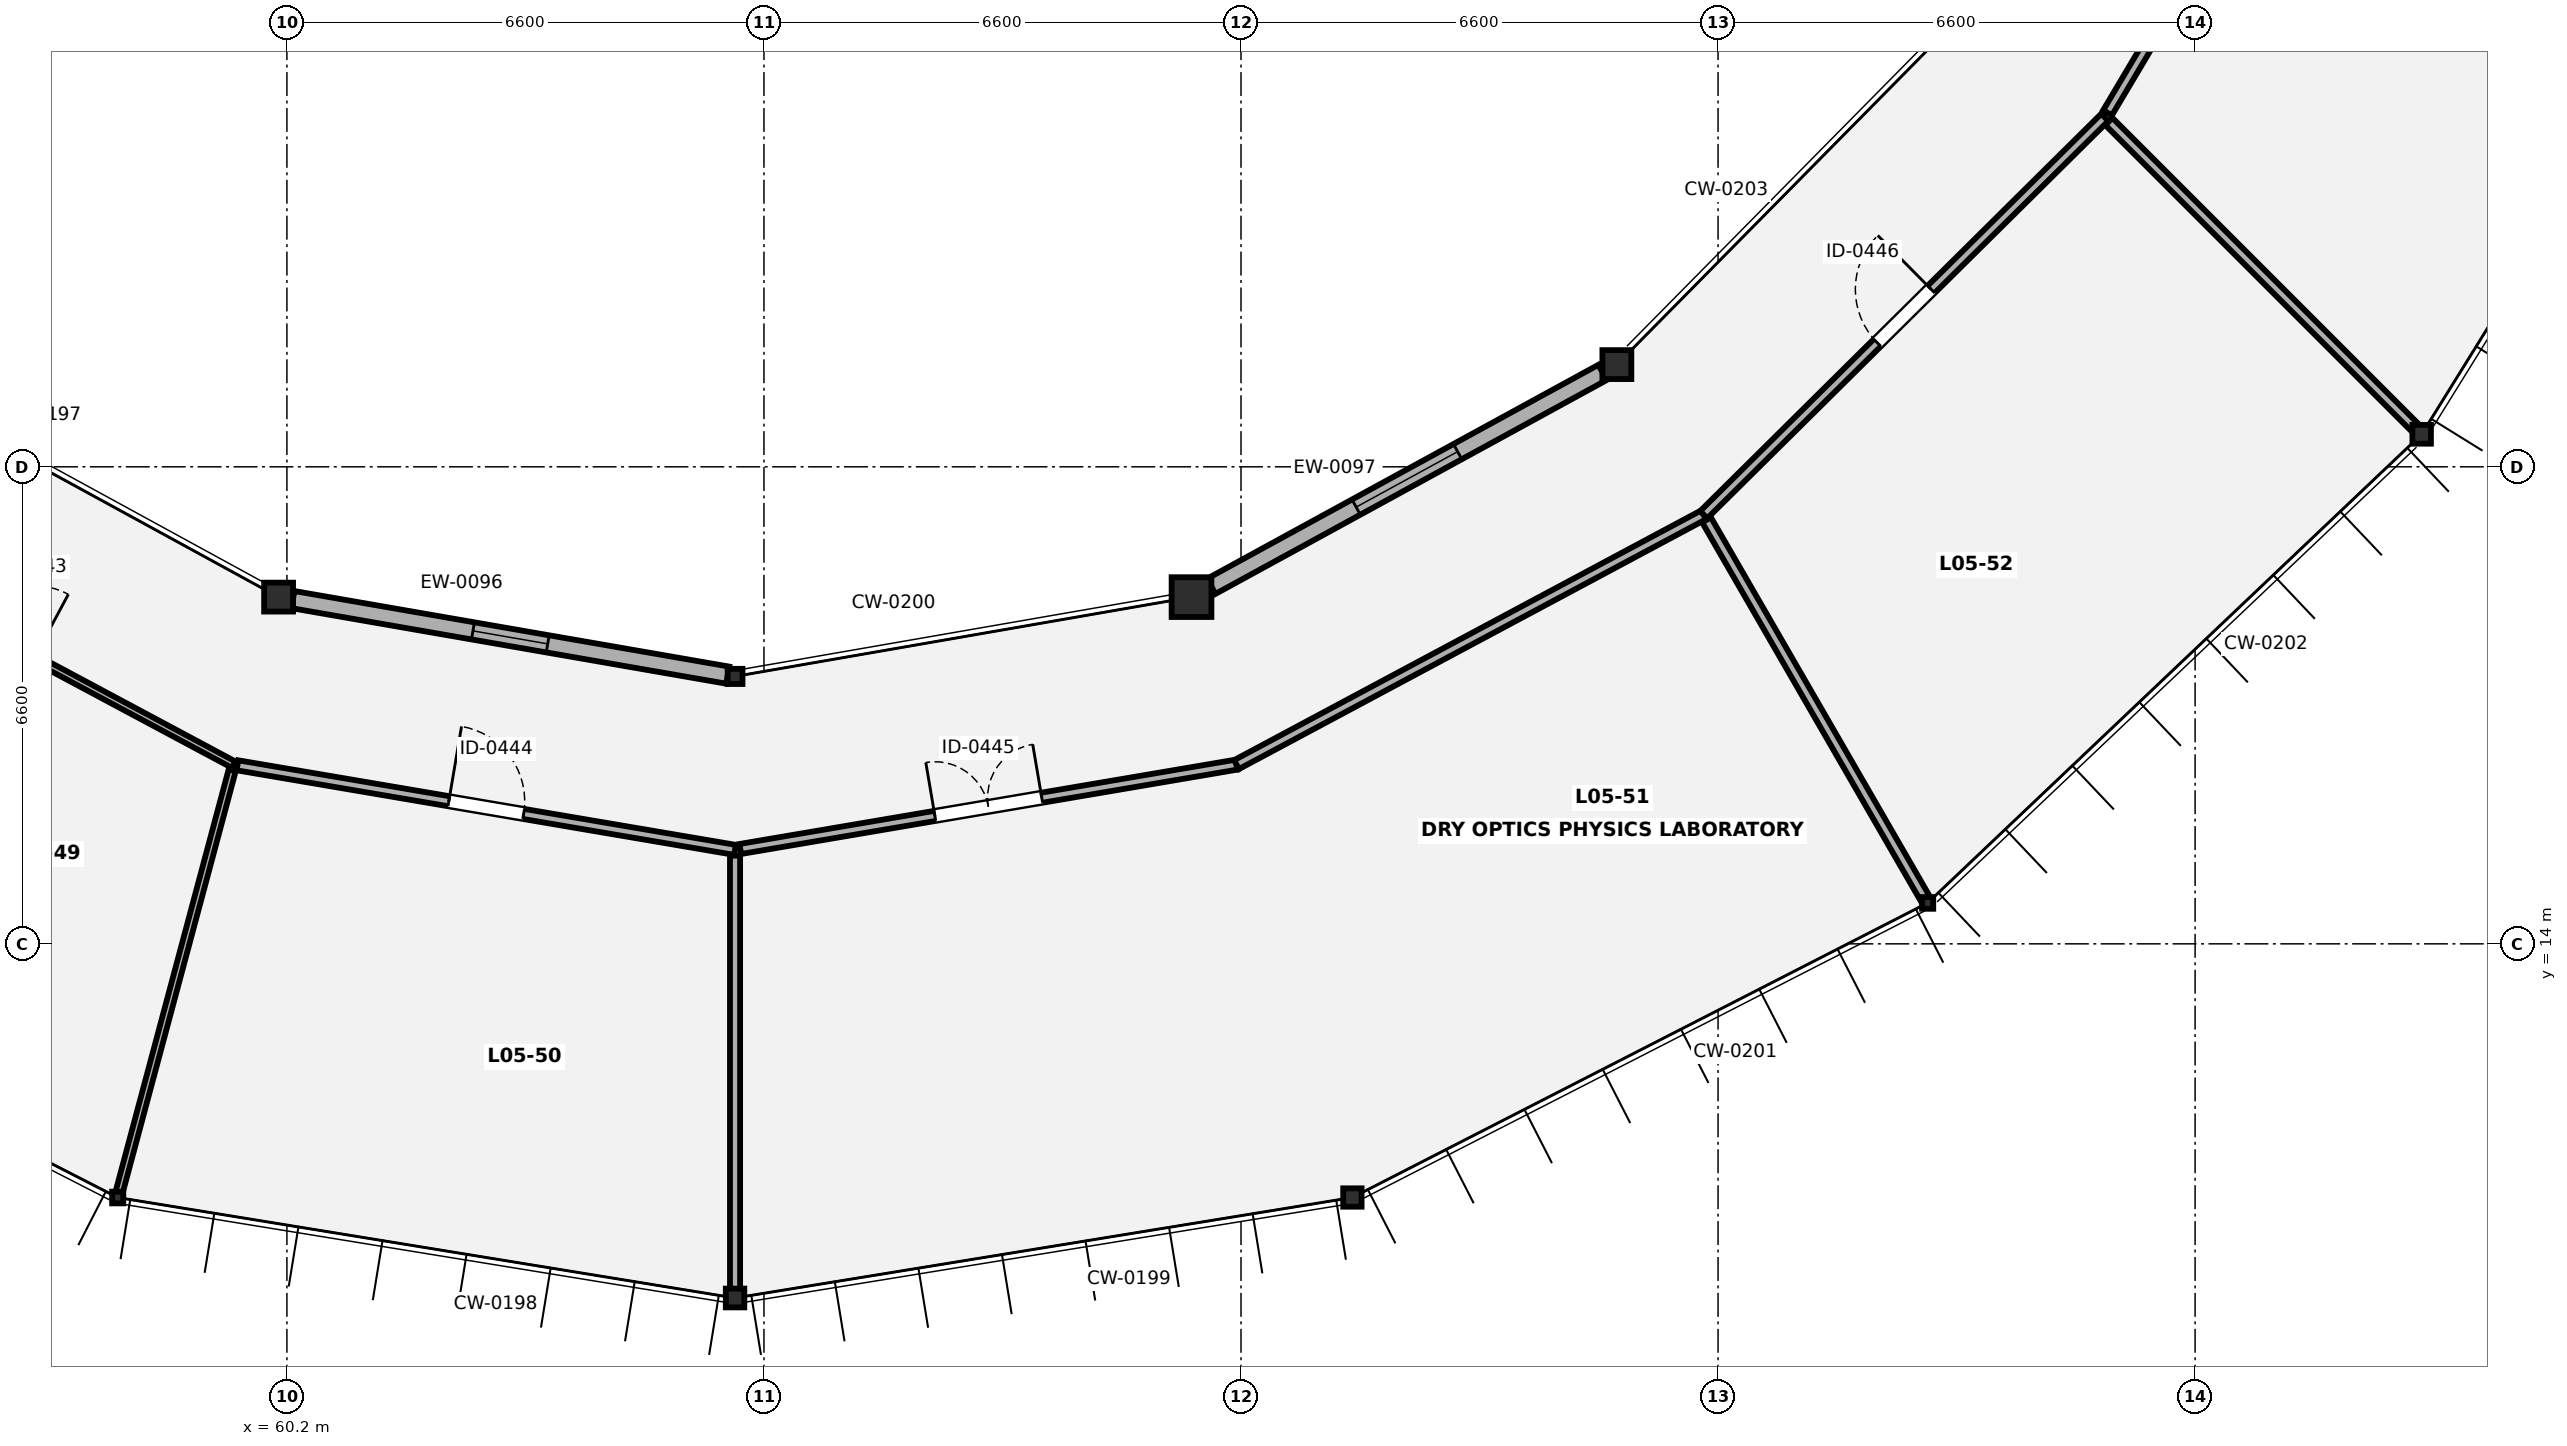
"""IFC4 building model, lengths in metres.
Left out: names, types, materials, properties, quantities, classifications, styles, units other than length and angle.
Written with IfcOpenShell. Run it as: python <this file> out.ifc"""

import sys

from ifc_helpers import new_model, si_unit, direction, frame, frame_2d, origin, origin_2d, place, context, subcontext, project, spatial, rectangle, i_section, extrude, element, fill, save


model = new_model("IFC4")
c1 = context("Model", 3, precision=1e-05, world=origin(), true_north=direction((0.0, 1.0)))
c2 = subcontext(c1, "Body", "Model", "MODEL_VIEW")
j1 = project(units=[si_unit("LENGTHUNIT", "METRE"), si_unit("PLANEANGLEUNIT", "RADIAN")], contexts=[c1])
p1 = place(None, origin())
s1 = spatial("IfcSite", under=j1, at=p1, CompositionType="ELEMENT")
p2 = place(p1, origin())
s2 = spatial("IfcBuilding", under=s1, at=p2, CompositionType="ELEMENT")
p3 = place(p2, frame((0.0, 0.0, 21.7)))
s3 = spatial("IfcBuildingStorey", under=s2, at=p3, CompositionType="ELEMENT", Elevation=21.7)
p4 = place(p3, frame((57.859, 10.49, 0.0), z_axis=(0.0, 0.0, 1.0), x_axis=(1.0, 0.0, 0.0)))
e1 = element("IfcColumn", 1, at=p4, inside=s3, PredefinedType="COLUMN", context=c2, shape_type="SweptSolid", body=[
    extrude(i_section(OverallWidth=0.154, OverallDepth=0.162, WebThickness=0.008, FlangeThickness=0.011, FilletRadius=0.009, at=origin_2d()), origin(), (0.0, 0.0, 1.0), 4.2),
])
p5 = place(p3, frame((60.085, 18.797, 0.0), z_axis=(0.0, 0.0, 1.0), x_axis=(1.0, 0.0, 0.0)))
e2 = element("IfcColumn", 2, at=p5, inside=s3, PredefinedType="PILASTER", context=c2, shape_type="SweptSolid", body=[
    extrude(rectangle(XDim=0.4, YDim=0.4, at=origin_2d()), origin(), (0.0, 0.0, 1.0), 4.2),
])
p6 = place(p3, frame((66.4, 9.1, 0.0), z_axis=(0.0, 0.0, 1.0), x_axis=(1.0, 0.0, 0.0)))
e3 = element("IfcColumn", 3, at=p6, inside=s3, PredefinedType="COLUMN", context=c2, shape_type="SweptSolid", body=[
    extrude(i_section(OverallWidth=0.256, OverallDepth=0.26, WebThickness=0.01, FlangeThickness=0.017, FilletRadius=0.014, at=origin_2d()), origin(), (0.0, 0.0, 1.0), 4.2),
])
p7 = place(p3, frame((66.4, 17.7, 0.0), z_axis=(0.0, 0.0, 1.0), x_axis=(1.0, 0.0, 0.0)))
e4 = element("IfcColumn", 4, at=p7, inside=s3, PredefinedType="COLUMN", context=c2, shape_type="SweptSolid", body=[
    extrude(i_section(OverallWidth=0.205, OverallDepth=0.21, WebThickness=0.009, FlangeThickness=0.014, FilletRadius=0.011, at=origin_2d()), origin(), (0.0, 0.0, 1.0), 4.2),
])
p8 = place(p3, frame((74.941, 10.49, 0.0), z_axis=(0.0, 0.0, 1.0), x_axis=(1.0, 0.0, 0.0)))
e5 = element("IfcColumn", 5, at=p8, inside=s3, PredefinedType="COLUMN", context=c2, shape_type="SweptSolid", body=[
    extrude(i_section(OverallWidth=0.254, OverallDepth=0.254, WebThickness=0.009, FlangeThickness=0.014, FilletRadius=0.014, at=origin_2d()), origin(), (0.0, 0.0, 1.0), 4.2),
])
p9 = place(p3, frame((72.715, 18.797, 0.0), z_axis=(0.0, 0.0, 1.0), x_axis=(1.0, 0.0, 0.0)))
e6 = element("IfcColumn", 6, at=p9, inside=s3, PredefinedType="COLUMN", context=c2, shape_type="SweptSolid", body=[
    extrude(rectangle(XDim=0.55, YDim=0.55, at=origin_2d()), origin(), (0.0, 0.0, 1.0), 4.2),
])
p10 = place(p3, frame((82.9, 14.566, 0.0), z_axis=(0.0, 0.0, 1.0), x_axis=(1.0, 0.0, 0.0)))
e7 = element("IfcColumn", 7, at=p10, inside=s3, PredefinedType="COLUMN", context=c2, shape_type="SweptSolid", body=[
    extrude(i_section(OverallWidth=0.154, OverallDepth=0.162, WebThickness=0.008, FlangeThickness=0.011, FilletRadius=0.009, at=origin_2d()), origin(), (0.0, 0.0, 1.0), 4.2),
])
p11 = place(p3, frame((78.6, 22.014, 0.0), z_axis=(0.0, 0.0, 1.0), x_axis=(1.0, 0.0, 0.0)))
e8 = element("IfcColumn", 8, at=p11, inside=s3, PredefinedType="PILASTER", context=c2, shape_type="SweptSolid", body=[
    extrude(rectangle(XDim=0.4, YDim=0.4, at=origin_2d()), origin(), (0.0, 0.0, 1.0), 4.2),
])
p12 = place(p3, frame((89.735, 21.05, 0.0), z_axis=(0.0, 0.0, 1.0), x_axis=(1.0, 0.0, 0.0)))
e9 = element("IfcColumn", 9, at=p12, inside=s3, PredefinedType="COLUMN", context=c2, shape_type="SweptSolid", body=[
    extrude(i_section(OverallWidth=0.256, OverallDepth=0.26, WebThickness=0.01, FlangeThickness=0.017, FilletRadius=0.014, at=origin_2d()), origin(), (0.0, 0.0, 1.0), 4.2),
])
p13 = place(p3, frame((60.283, 18.763, 0.0), z_axis=(0.0, 0.0, 1.0), x_axis=(0.985246064368, -0.171143777706, 0.0)))
e10 = element("IfcWall", 10, at=p13, inside=s3, PredefinedType="SOLIDWALL", context=c2, shape_type="SweptSolid", body=[
    extrude(rectangle(XDim=6.107, YDim=0.24, at=frame_2d((3.053, 0.0))), origin(), (0.0, 0.0, 1.0), 3.65),
])
p14 = place(p13, frame((2.528, 0.0, 0.85)))
e11 = element("IfcOpeningElement", 11, at=p14, cuts=e10, PredefinedType="OPENING", context=c2, shape_type="SweptSolid", body=[
    extrude(rectangle(XDim=1.05, YDim=1.35, at=frame_2d((0.525, 0.675))), frame((0.0, 0.13, 0.0), z_axis=(0.0, -1.0, 0.0), x_axis=(1.0, 0.0, 0.0)), (0.0, 0.0, 1.0), 0.26),
])
p15 = place(p3, frame((72.988, 18.947, 0.0), z_axis=(0.0, 0.0, 1.0), x_axis=(0.877477839064, 0.479617182712, 0.0)))
e12 = element("IfcWall", 12, at=p15, inside=s3, PredefinedType="SOLIDWALL", context=c2, shape_type="SweptSolid", body=[
    extrude(rectangle(XDim=6.169, YDim=0.24, at=frame_2d((3.085, 0.0))), origin(), (0.0, 0.0, 1.0), 3.65),
])
p16 = place(p15, frame((2.285, 0.0, 0.85)))
e13 = element("IfcOpeningElement", 13, at=p16, cuts=e12, PredefinedType="OPENING", context=c2, shape_type="SweptSolid", body=[
    extrude(rectangle(XDim=1.6, YDim=1.5, at=frame_2d((0.8, 0.75))), frame((0.0, 0.13, 0.0), z_axis=(0.0, -1.0, 0.0), x_axis=(1.0, 0.0, 0.0)), (0.0, 0.0, 1.0), 0.26),
])
p17 = place(p3, frame((53.063, 19.902, 0.0), z_axis=(0.0, 0.0, 1.0), x_axis=(0.881826283139, -0.471574391125, 0.0)))
e14 = element("IfcWall", 14, at=p17, inside=s3, PredefinedType="PARTITIONING", context=c2, shape_type="SweptSolid", body=[
    extrude(rectangle(XDim=7.258, YDim=0.1, at=frame_2d((3.629, 0.0))), origin(), (0.0, 0.0, 1.0), 3.98),
])
p18 = place(p17, frame((3.129, 0.0, 0.0)))
e15 = element("IfcOpeningElement", 15, at=p18, cuts=e14, PredefinedType="OPENING", context=c2, shape_type="SweptSolid", body=[
    extrude(rectangle(XDim=1.0, YDim=2.1, at=frame_2d((0.5, 1.05))), frame((0.0, 0.06, 0.0), z_axis=(0.0, -1.0, 0.0), x_axis=(1.0, 0.0, 0.0)), (0.0, 0.0, 1.0), 0.12),
])
p19 = place(p3, frame((59.443, 16.402, 0.0), z_axis=(0.0, 0.0, 1.0), x_axis=(-0.258805895167, -0.965929349708, 0.0)))
e16 = element("IfcWall", 16, at=p19, inside=s3, PredefinedType="PARTITIONING", context=c2, shape_type="SweptSolid", body=[
    extrude(rectangle(XDim=6.06, YDim=0.1, at=frame_2d((3.03, 0.0))), origin(), (0.0, 0.0, 1.0), 3.323),
])
p20 = place(p3, frame((59.515, 16.47, 0.0), z_axis=(0.0, 0.0, 1.0), x_axis=(0.985861622289, -0.167561516157, 0.0)))
e17 = element("IfcWall", 17, at=p20, inside=s3, PredefinedType="PARTITIONING", context=c2, shape_type="SweptSolid", body=[
    extrude(rectangle(XDim=6.983, YDim=0.14, at=frame_2d((3.492, 0.0))), origin(), (0.0, 0.0, 1.0), 3.98),
])
p21 = place(p20, frame((2.967, 0.0, 0.0)))
e18 = element("IfcOpeningElement", 18, at=p21, cuts=e17, PredefinedType="OPENING", context=c2, shape_type="SweptSolid", body=[
    extrude(rectangle(XDim=1.05, YDim=2.15, at=frame_2d((0.525, 1.075))), frame((0.0, 0.08, 0.0), z_axis=(0.0, -1.0, 0.0), x_axis=(1.0, 0.0, 0.0)), (0.0, 0.0, 1.0), 0.16),
])
p22 = place(p3, frame((66.4, 15.22, 0.0), z_axis=(0.0, 0.0, 1.0), x_axis=(0.0, -1.0, 0.0)))
e19 = element("IfcWall", 19, at=p22, inside=s3, PredefinedType="PARTITIONING", context=c2, shape_type="SweptSolid", body=[
    extrude(rectangle(XDim=6.06, YDim=0.14, at=frame_2d((3.03, 0.0))), origin(), (0.0, 0.0, 1.0), 3.471),
])
p23 = place(p3, frame((66.472, 15.312, 0.0), z_axis=(0.0, 0.0, 1.0), x_axis=(0.985861002198, 0.167565164474, 0.0)))
e20 = element("IfcWall", 20, at=p23, inside=s3, PredefinedType="PARTITIONING", context=c2, shape_type="SweptSolid", body=[
    extrude(rectangle(XDim=6.963, YDim=0.14, at=frame_2d((3.481, 0.0))), origin(), (0.0, 0.0, 1.0), 3.98),
])
p24 = place(p23, frame((2.731, 0.0, 0.0)))
e21 = element("IfcOpeningElement", 21, at=p24, cuts=e20, PredefinedType="OPENING", context=c2, shape_type="SweptSolid", body=[
    extrude(rectangle(XDim=1.5, YDim=2.15, at=frame_2d((0.75, 1.075))), frame((0.0, 0.08, 0.0), z_axis=(0.0, -1.0, 0.0), x_axis=(1.0, 0.0, 0.0)), (0.0, 0.0, 1.0), 0.16),
])
p25 = place(p3, frame((73.338, 16.48, 0.0), z_axis=(0.0, 0.0, 1.0), x_axis=(0.881830395915, 0.471566700309, 0.0)))
e22 = element("IfcWall", 22, at=p25, inside=s3, PredefinedType="PARTITIONING", context=c2, shape_type="SweptSolid", body=[
    extrude(rectangle(XDim=7.328, YDim=0.14, at=frame_2d((3.664, 0.0))), origin(), (0.0, 0.0, 1.0), 3.98),
])
p26 = place(p3, frame((79.84, 19.866, 0.0), z_axis=(0.0, 0.0, 1.0), x_axis=(0.500008418462, -0.866020543329, 0.0)))
e23 = element("IfcWall", 23, at=p26, inside=s3, PredefinedType="PARTITIONING", context=c2, shape_type="SweptSolid", body=[
    extrude(rectangle(XDim=6.06, YDim=0.14, at=frame_2d((3.03, 0.0))), origin(), (0.0, 0.0, 1.0), 3.313),
])
p27 = place(p3, frame((79.802, 19.937, 0.0), z_axis=(0.0, 0.0, 1.0), x_axis=(0.710427757183, 0.703770134222, 0.0)))
e24 = element("IfcWall", 24, at=p27, inside=s3, PredefinedType="PARTITIONING", context=c2, shape_type="SweptSolid", body=[
    extrude(rectangle(XDim=7.811, YDim=0.14, at=frame_2d((3.905, 0.0))), origin(), (0.0, 0.0, 1.0), 3.98),
])
p28 = place(p27, frame((3.381, 0.0, 0.0)))
e25 = element("IfcOpeningElement", 25, at=p28, cuts=e24, PredefinedType="OPENING", context=c2, shape_type="SweptSolid", body=[
    extrude(rectangle(XDim=1.05, YDim=2.15, at=frame_2d((0.525, 1.075))), frame((0.0, 0.08, 0.0), z_axis=(0.0, -1.0, 0.0), x_axis=(1.0, 0.0, 0.0)), (0.0, 0.0, 1.0), 0.16),
])
p29 = place(p3, frame((85.407, 25.377, 0.0), z_axis=(0.0, 0.0, 1.0), x_axis=(0.707106781187, -0.707106781187, 0.0)))
e26 = element("IfcWall", 26, at=p29, inside=s3, PredefinedType="PARTITIONING", context=c2, shape_type="SweptSolid", body=[
    extrude(rectangle(XDim=6.06, YDim=0.14, at=frame_2d((3.03, 0.0))), origin(), (0.0, 0.0, 1.0), 3.323),
])
p30 = place(p3, frame((85.388, 25.498, 0.0), z_axis=(0.0, 0.0, 1.0), x_axis=(0.510914893672, 0.8596312997, 0.0)))
e27 = element("IfcWall", 27, at=p30, inside=s3, PredefinedType="PARTITIONING", context=c2, shape_type="SweptSolid", body=[
    extrude(rectangle(XDim=8.262, YDim=0.14, at=frame_2d((4.131, 0.0))), origin(), (0.0, 0.0, 1.0), 3.98),
])
p31 = place(p30, frame((3.381, 0.0, 0.0)))
e28 = element("IfcOpeningElement", 28, at=p31, cuts=e27, PredefinedType="OPENING", context=c2, shape_type="SweptSolid", body=[
    extrude(rectangle(XDim=1.5, YDim=2.15, at=frame_2d((0.75, 1.075))), frame((0.0, 0.08, 0.0), z_axis=(0.0, -1.0, 0.0), x_axis=(1.0, 0.0, 0.0)), (0.0, 0.0, 1.0), 0.16),
])
p32 = place(p14, origin())
e29 = element("IfcWindow", 29, at=p32, inside=s3, PartitioningType="SINGLE_PANEL", PredefinedType="WINDOW", context=c2, shape_type="SweptSolid", body=[
    extrude(rectangle(XDim=1.05, YDim=1.35, at=frame_2d((0.525, 0.675))), frame((0.0, 0.03, 0.0), z_axis=(0.0, -1.0, 0.0), x_axis=(1.0, 0.0, 0.0)), (0.0, 0.0, 1.0), 0.06),
])
fill(e11, e29)
p33 = place(p16, origin())
e30 = element("IfcWindow", 30, at=p33, inside=s3, PartitioningType="SINGLE_PANEL", PredefinedType="WINDOW", context=c2, shape_type="SweptSolid", body=[
    extrude(rectangle(XDim=1.6, YDim=1.5, at=frame_2d((0.8, 0.75))), frame((0.0, 0.03, 0.0), z_axis=(0.0, -1.0, 0.0), x_axis=(1.0, 0.0, 0.0)), (0.0, 0.0, 1.0), 0.06),
])
fill(e13, e30)
p34 = place(p21, origin())
e31 = element("IfcDoor", 31, at=p34, inside=s3, OperationType="SINGLE_SWING_LEFT", PredefinedType="DOOR", context=c2, shape_type="SweptSolid", body=[
    extrude(rectangle(XDim=1.05, YDim=2.15, at=frame_2d((0.525, 1.075))), frame((0.0, 0.025, 0.0), z_axis=(0.0, -1.0, 0.0), x_axis=(1.0, 0.0, 0.0)), (0.0, 0.0, 1.0), 0.05),
])
fill(e18, e31)
p35 = place(p24, origin())
e32 = element("IfcDoor", 32, at=p35, inside=s3, OperationType="DOUBLE_DOOR_SINGLE_SWING", PredefinedType="DOOR", context=c2, shape_type="SweptSolid", body=[
    extrude(rectangle(XDim=1.5, YDim=2.15, at=frame_2d((0.75, 1.075))), frame((0.0, 0.025, 0.0), z_axis=(0.0, -1.0, 0.0), x_axis=(1.0, 0.0, 0.0)), (0.0, 0.0, 1.0), 0.05),
])
fill(e21, e32)
p36 = place(p28, origin())
e33 = element("IfcDoor", 33, at=p36, inside=s3, OperationType="SINGLE_SWING_RIGHT", PredefinedType="DOOR", context=c2, shape_type="SweptSolid", body=[
    extrude(rectangle(XDim=1.05, YDim=2.15, at=frame_2d((0.525, 1.075))), frame((0.0, 0.025, 0.0), z_axis=(0.0, -1.0, 0.0), x_axis=(1.0, 0.0, 0.0)), (0.0, 0.0, 1.0), 0.05),
])
fill(e25, e33)
save(model, sys.argv[1])
